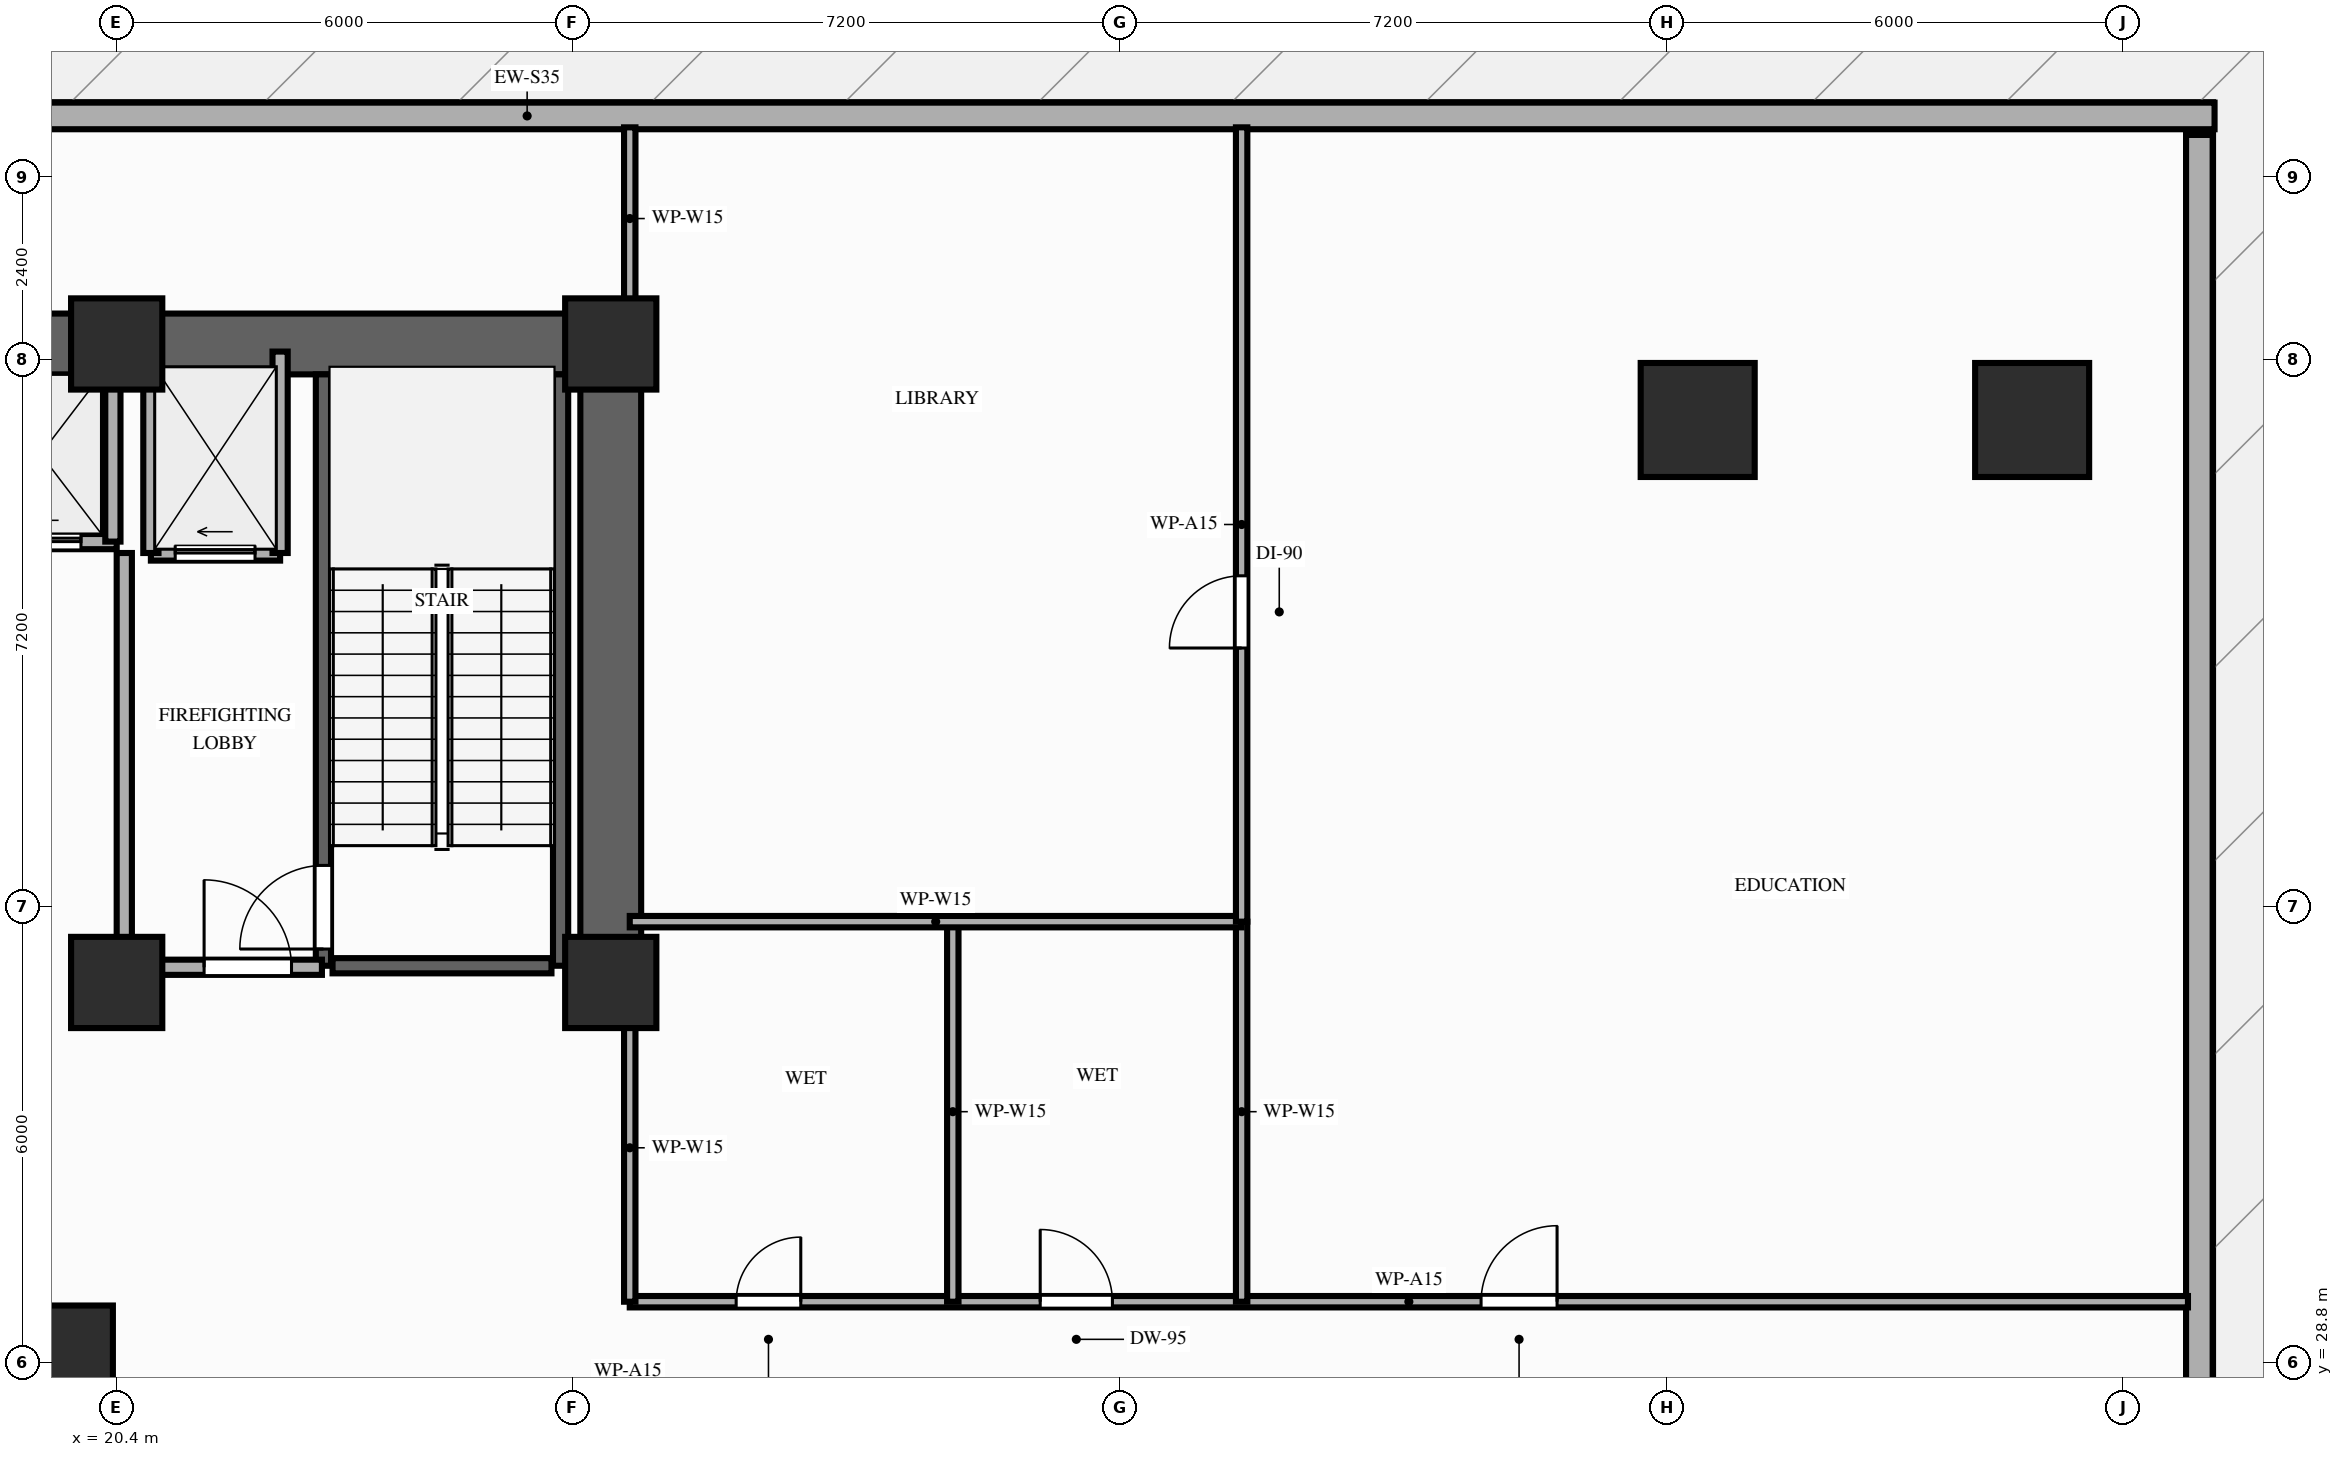
"""IFC4 building model, lengths in metres.
Left out: names, types, materials, properties, quantities, classifications, styles, units other than length and angle.
Written with IfcOpenShell. Run it as: python <this file> out.ifc"""

import sys

from ifc_helpers import new_model, si_unit, direction, frame, frame_2d, origin, origin_2d, place, context, subcontext, project, spatial, rectangle, extrude, element, fill, save


model = new_model("IFC4")
c1 = context("Model", 3, precision=1e-05, world=origin(), true_north=direction((0.0, 1.0)))
c2 = subcontext(c1, "Body", "Model", "MODEL_VIEW")
j1 = project(units=[si_unit("LENGTHUNIT", "METRE"), si_unit("PLANEANGLEUNIT", "RADIAN")], contexts=[c1])
p1 = place(None, origin())
s1 = spatial("IfcSite", under=j1, at=p1, CompositionType="ELEMENT")
p2 = place(p1, origin())
s2 = spatial("IfcBuilding", under=s1, at=p2, CompositionType="ELEMENT")
p3 = place(p2, frame((0.0, 0.0, 21.8)))
s3 = spatial("IfcBuildingStorey", under=s2, at=p3, CompositionType="ELEMENT", Elevation=21.8)
for number, where, z_axis, x_axis in (
    (1, (20.4, 33.8, 0.0), (0.0, 0.0, 1.0), (1.0, 0.0, 0.0)),
    (2, (26.9, 33.8, 0.0), (0.0, 0.0, 1.0), (1.0, 0.0, 0.0)),
    (3, (20.4, 42.2, 0.0), (0.0, 0.0, 1.0), (1.0, 0.0, 0.0)),
    (4, (26.9, 42.2, 0.0), (0.0, 0.0, 1.0), (1.0, 0.0, 0.0)),
):
    element("IfcColumn", number, at=place(p3, frame(where, z_axis=z_axis, x_axis=x_axis)), inside=s3, PredefinedType="COLUMN", context=c2, shape_type="SweptSolid", body=[
        extrude(rectangle(XDim=1.2, YDim=1.2, at=origin_2d()), origin(), (0.0, 0.0, 1.0), 4.6),
    ])
for number, where, z_axis, x_axis in (
    (5, (19.6, 28.8, 0.0), (0.0, 0.0, 1.0), (1.0, 0.0, 0.0)),
    (6, (41.2, 41.2, 0.0), (0.0, 0.0, 1.0), (1.0, 0.0, 0.0)),
):
    element("IfcColumn", number, at=place(p3, frame(where, z_axis=z_axis, x_axis=x_axis)), inside=s3, PredefinedType="COLUMN", context=c2, shape_type="SweptSolid", body=[
        extrude(rectangle(XDim=1.5, YDim=1.5, at=origin_2d()), origin(), (0.0, 0.0, 1.0), 4.05),
    ])
p4 = place(p3, frame((45.6, 41.2, 0.0), z_axis=(0.0, 0.0, 1.0), x_axis=(1.0, 0.0, 0.0)))
e7 = element("IfcColumn", 7, at=p4, inside=s3, PredefinedType="COLUMN", context=c2, shape_type="SweptSolid", body=[
    extrude(rectangle(XDim=1.5, YDim=1.5, at=origin_2d()), origin(), (0.0, 0.0, 1.0), 4.6),
])
p5 = place(p3, frame((48.0, 45.2, 0.0), z_axis=(0.0, 0.0, 1.0), x_axis=(-1.0, 0.0, 0.0)))
e8 = element("IfcWall", 8, at=p5, inside=s3, PredefinedType="STANDARD", context=c2, shape_type="SweptSolid", body=[
    extrude(rectangle(XDim=44.4, YDim=0.35, at=frame_2d((22.2, 0.0))), origin(), (0.0, 0.0, 1.0), 4.36),
])
p6 = place(p3, frame((47.8, 8.65, 0.0), z_axis=(0.0, 0.0, 1.0), x_axis=(0.0, 1.0, 0.0)))
e9 = element("IfcWall", 9, at=p6, inside=s3, PredefinedType="STANDARD", context=c2, shape_type="SweptSolid", body=[
    extrude(rectangle(XDim=36.3, YDim=0.35, at=frame_2d((18.15, 0.0))), origin(), (0.0, 0.0, 1.0), 4.36),
])
p7 = place(p6, frame((3.4, 0.0, 0.0)))
e10 = element("IfcOpeningElement", 10, at=p7, cuts=e9, PredefinedType="OPENING", context=c2, shape_type="SweptSolid", body=[
    extrude(rectangle(XDim=1.6, YDim=2.15, at=frame_2d((0.8, 1.075))), frame((0.0, 0.185, 0.0), z_axis=(0.0, -1.0, 0.0), x_axis=(1.0, 0.0, 0.0)), (0.0, 0.0, 1.0), 0.37),
])
p8 = place(p3, frame((6.45, 42.2, 0.0), z_axis=(0.0, 0.0, 1.0), x_axis=(1.0, 0.0, 0.0)))
e11 = element("IfcWall", 11, at=p8, inside=s3, PredefinedType="SHEAR", context=c2, shape_type="SweptSolid", body=[
    extrude(rectangle(XDim=20.45, YDim=0.8, at=frame_2d((10.225, 0.0))), origin(), (0.0, 0.0, 1.0), 4.36),
])
p9 = place(p3, frame((26.9, 33.8, 0.0), z_axis=(0.0, 0.0, 1.0), x_axis=(0.0, 1.0, 0.0)))
e12 = element("IfcWall", 12, at=p9, inside=s3, PredefinedType="SHEAR", context=c2, shape_type="SweptSolid", body=[
    extrude(rectangle(XDim=7.95, YDim=0.8, at=frame_2d((3.975, 0.0))), origin(), (0.0, 0.0, 1.0), 4.36),
])
p10 = place(p3, frame((23.12, 34.02, 0.0), z_axis=(0.0, 0.0, 1.0), x_axis=(0.0, 1.0, 0.0)))
e13 = element("IfcWall", 13, at=p10, inside=s3, PredefinedType="SHEAR", context=c2, shape_type="SweptSolid", body=[
    extrude(rectangle(XDim=7.78, YDim=0.2, at=frame_2d((3.89, 0.0))), origin(), (0.0, 0.0, 1.0), 4.36),
])
p11 = place(p10, frame((0.22, 0.0, 0.0)))
e14 = element("IfcOpeningElement", 14, at=p11, cuts=e13, PredefinedType="OPENING", context=c2, shape_type="SweptSolid", body=[
    extrude(rectangle(XDim=1.1, YDim=2.15, at=frame_2d((0.55, 1.075))), frame((0.0, 0.11, 0.0), z_axis=(0.0, -1.0, 0.0), x_axis=(1.0, 0.0, 0.0)), (0.0, 0.0, 1.0), 0.22),
])
p12 = place(p3, frame((26.24, 34.02, 0.0), z_axis=(0.0, 0.0, 1.0), x_axis=(0.0, 1.0, 0.0)))
e15 = element("IfcWall", 15, at=p12, inside=s3, PredefinedType="SHEAR", context=c2, shape_type="SweptSolid", body=[
    extrude(rectangle(XDim=7.78, YDim=0.2, at=frame_2d((3.89, 0.0))), origin(), (0.0, 0.0, 1.0), 4.36),
])
p13 = place(p3, frame((23.24, 34.02, 0.0), z_axis=(0.0, 0.0, 1.0), x_axis=(1.0, 0.0, 0.0)))
e16 = element("IfcWall", 16, at=p13, inside=s3, PredefinedType="SHEAR", context=c2, shape_type="SweptSolid", body=[
    extrude(rectangle(XDim=2.88, YDim=0.2, at=frame_2d((1.44, 0.0))), origin(), (0.0, 0.0, 1.0), 4.36),
])
p14 = place(p3, frame((20.85, 39.45, 0.0), z_axis=(0.0, 0.0, 1.0), x_axis=(1.0, 0.0, 0.0)))
e17 = element("IfcWall", 17, at=p14, inside=s3, PredefinedType="MOVABLE", context=c2, shape_type="SweptSolid", body=[
    extrude(rectangle(XDim=1.7, YDim=0.2, at=frame_2d((0.85, 0.0))), origin(), (0.0, 0.0, 1.0), 4.36),
])
p15 = place(p14, frame((0.32, 0.0, 0.0)))
e18 = element("IfcOpeningElement", 18, at=p15, cuts=e17, PredefinedType="OPENING", context=c2, shape_type="SweptSolid", body=[
    extrude(rectangle(XDim=1.05, YDim=2.15, at=frame_2d((0.525, 1.075))), frame((0.0, 0.11, 0.0), z_axis=(0.0, -1.0, 0.0), x_axis=(1.0, 0.0, 0.0)), (0.0, 0.0, 1.0), 0.22),
])
for number, where, z_axis, x_axis in (
    (19, (20.85, 39.45, 0.0), (0.0, 0.0, 1.0), (0.0, 1.0, 0.0)),
    (20, (22.55, 39.45, 0.0), (0.0, 0.0, 1.0), (0.0, 1.0, 0.0)),
):
    element("IfcWall", number, at=place(p3, frame(where, z_axis=z_axis, x_axis=x_axis)), inside=s3, PredefinedType="MOVABLE", context=c2, shape_type="SweptSolid", body=[
        extrude(rectangle(XDim=2.65, YDim=0.2, at=frame_2d((1.325, 0.0))), origin(), (0.0, 0.0, 1.0), 3.74),
    ])
p16 = place(p3, frame((20.5, 34.0, 0.0), z_axis=(0.0, 0.0, 1.0), x_axis=(0.0, 1.0, 0.0)))
e21 = element("IfcWall", 21, at=p16, inside=s3, PredefinedType="PARTITIONING", context=c2, shape_type="SweptSolid", body=[
    extrude(rectangle(XDim=5.45, YDim=0.2, at=frame_2d((2.725, 0.0))), origin(), (0.0, 0.0, 1.0), 3.74),
])
p17 = place(p3, frame((20.5, 34.0, 0.0), z_axis=(0.0, 0.0, 1.0), x_axis=(1.0, 0.0, 0.0)))
e22 = element("IfcWall", 22, at=p17, inside=s3, PredefinedType="PARTITIONING", context=c2, shape_type="SweptSolid", body=[
    extrude(rectangle(XDim=2.6, YDim=0.2, at=frame_2d((1.3, 0.0))), origin(), (0.0, 0.0, 1.0), 3.74),
])
p18 = place(p17, frame((1.05, 0.0, 0.0)))
e23 = element("IfcOpeningElement", 23, at=p18, cuts=e22, PredefinedType="OPENING", context=c2, shape_type="SweptSolid", body=[
    extrude(rectangle(XDim=1.15, YDim=2.15, at=frame_2d((0.575, 1.075))), frame((0.0, 0.11, 0.0), z_axis=(0.0, -1.0, 0.0), x_axis=(1.0, 0.0, 0.0)), (0.0, 0.0, 1.0), 0.22),
])
p19 = place(p3, frame((13.0, 39.6, 0.0), z_axis=(0.0, 0.0, 1.0), x_axis=(1.0, 0.0, 0.0)))
e24 = element("IfcWall", 24, at=p19, inside=s3, PredefinedType="MOVABLE", context=c2, shape_type="SweptSolid", body=[
    extrude(rectangle(XDim=7.4, YDim=0.2, at=frame_2d((3.7, 0.0))), origin(), (0.0, 0.0, 1.0), 4.36),
])
p20 = place(p19, frame((0.47, 0.0, 0.0)))
e25 = element("IfcOpeningElement", 25, at=p20, cuts=e24, PredefinedType="OPENING", context=c2, shape_type="SweptSolid", body=[
    extrude(rectangle(XDim=1.05, YDim=2.15, at=frame_2d((0.525, 1.075))), frame((0.0, 0.11, 0.0), z_axis=(0.0, -1.0, 0.0), x_axis=(1.0, 0.0, 0.0)), (0.0, 0.0, 1.0), 0.22),
])
p21 = place(p19, frame((2.28, 0.0, 0.0)))
e26 = element("IfcOpeningElement", 26, at=p21, cuts=e24, PredefinedType="OPENING", context=c2, shape_type="SweptSolid", body=[
    extrude(rectangle(XDim=1.05, YDim=2.15, at=frame_2d((0.525, 1.075))), frame((0.0, 0.11, 0.0), z_axis=(0.0, -1.0, 0.0), x_axis=(1.0, 0.0, 0.0)), (0.0, 0.0, 1.0), 0.22),
])
p22 = place(p19, frame((4.08, 0.0, 0.0)))
e27 = element("IfcOpeningElement", 27, at=p22, cuts=e24, PredefinedType="OPENING", context=c2, shape_type="SweptSolid", body=[
    extrude(rectangle(XDim=1.05, YDim=2.15, at=frame_2d((0.525, 1.075))), frame((0.0, 0.11, 0.0), z_axis=(0.0, -1.0, 0.0), x_axis=(1.0, 0.0, 0.0)), (0.0, 0.0, 1.0), 0.22),
])
p23 = place(p19, frame((5.88, 0.0, 0.0)))
e28 = element("IfcOpeningElement", 28, at=p23, cuts=e24, PredefinedType="OPENING", context=c2, shape_type="SweptSolid", body=[
    extrude(rectangle(XDim=1.05, YDim=2.15, at=frame_2d((0.525, 1.075))), frame((0.0, 0.11, 0.0), z_axis=(0.0, -1.0, 0.0), x_axis=(1.0, 0.0, 0.0)), (0.0, 0.0, 1.0), 0.22),
])
p24 = place(p3, frame((20.35, 39.6, 0.0), z_axis=(0.0, 0.0, 1.0), x_axis=(0.0, 1.0, 0.0)))
e29 = element("IfcWall", 29, at=p24, inside=s3, PredefinedType="MOVABLE", context=c2, shape_type="SweptSolid", body=[
    extrude(rectangle(XDim=2.18, YDim=0.2, at=frame_2d((1.09, 0.0))), origin(), (0.0, 0.0, 1.0), 4.36),
])
p25 = place(p3, frame((27.15, 29.6, 0.0), z_axis=(0.0, 0.0, 1.0), x_axis=(1.0, 0.0, 0.0)))
e30 = element("IfcWall", 30, at=p25, inside=s3, PredefinedType="PARTITIONING", context=c2, shape_type="SweptSolid", body=[
    extrude(rectangle(XDim=20.5, YDim=0.15, at=frame_2d((10.25, 0.0))), origin(), (0.0, 0.0, 1.0), 3.74),
])
p26 = place(p25, frame((1.4, 0.0, 0.0)))
e31 = element("IfcOpeningElement", 31, at=p26, cuts=e30, PredefinedType="OPENING", context=c2, shape_type="SweptSolid", body=[
    extrude(rectangle(XDim=0.85, YDim=2.1, at=frame_2d((0.425, 1.05))), frame((0.0, 0.085, 0.0), z_axis=(0.0, -1.0, 0.0), x_axis=(1.0, 0.0, 0.0)), (0.0, 0.0, 1.0), 0.17),
])
p27 = place(p25, frame((5.4, 0.0, 0.0)))
e32 = element("IfcOpeningElement", 32, at=p27, cuts=e30, PredefinedType="OPENING", context=c2, shape_type="SweptSolid", body=[
    extrude(rectangle(XDim=0.95, YDim=2.1, at=frame_2d((0.475, 1.05))), frame((0.0, 0.085, 0.0), z_axis=(0.0, -1.0, 0.0), x_axis=(1.0, 0.0, 0.0)), (0.0, 0.0, 1.0), 0.17),
])
p28 = place(p25, frame((11.2, 0.0, 0.0)))
e33 = element("IfcOpeningElement", 33, at=p28, cuts=e30, PredefinedType="OPENING", context=c2, shape_type="SweptSolid", body=[
    extrude(rectangle(XDim=1.0, YDim=2.15, at=frame_2d((0.5, 1.075))), frame((0.0, 0.085, 0.0), z_axis=(0.0, -1.0, 0.0), x_axis=(1.0, 0.0, 0.0)), (0.0, 0.0, 1.0), 0.17),
])
p29 = place(p3, frame((27.15, 29.6, 0.0), z_axis=(0.0, 0.0, 1.0), x_axis=(0.0, 1.0, 0.0)))
e34 = element("IfcWall", 34, at=p29, inside=s3, PredefinedType="PARTITIONING", context=c2, shape_type="SweptSolid", body=[
    extrude(rectangle(XDim=4.05, YDim=0.15, at=frame_2d((2.025, 0.0))), origin(), (0.0, 0.0, 1.0), 3.74),
])
p30 = place(p3, frame((27.15, 42.65, 0.0), z_axis=(0.0, 0.0, 1.0), x_axis=(0.0, 1.0, 0.0)))
e35 = element("IfcWall", 35, at=p30, inside=s3, PredefinedType="PARTITIONING", context=c2, shape_type="SweptSolid", body=[
    extrude(rectangle(XDim=2.4, YDim=0.15, at=frame_2d((1.2, 0.0))), origin(), (0.0, 0.0, 1.0), 4.36),
])
p31 = place(p3, frame((31.4, 29.6, 0.0), z_axis=(0.0, 0.0, 1.0), x_axis=(0.0, 1.0, 0.0)))
e36 = element("IfcWall", 36, at=p31, inside=s3, PredefinedType="PARTITIONING", context=c2, shape_type="SweptSolid", body=[
    extrude(rectangle(XDim=5.0, YDim=0.15, at=frame_2d((2.5, 0.0))), origin(), (0.0, 0.0, 1.0), 3.74),
])
p32 = place(p3, frame((35.2, 29.6, 0.0), z_axis=(0.0, 0.0, 1.0), x_axis=(0.0, 1.0, 0.0)))
e37 = element("IfcWall", 37, at=p32, inside=s3, PredefinedType="PARTITIONING", context=c2, shape_type="SweptSolid", body=[
    extrude(rectangle(XDim=5.0, YDim=0.15, at=frame_2d((2.5, 0.0))), origin(), (0.0, 0.0, 1.0), 3.95),
])
p33 = place(p3, frame((27.15, 34.6, 0.0), z_axis=(0.0, 0.0, 1.0), x_axis=(1.0, 0.0, 0.0)))
e38 = element("IfcWall", 38, at=p33, inside=s3, PredefinedType="PARTITIONING", context=c2, shape_type="SweptSolid", body=[
    extrude(rectangle(XDim=8.05, YDim=0.15, at=frame_2d((4.025, 0.0))), origin(), (0.0, 0.0, 1.0), 3.74),
])
p34 = place(p3, frame((35.2, 34.6, 0.0), z_axis=(0.0, 0.0, 1.0), x_axis=(0.0, 1.0, 0.0)))
e39 = element("IfcWall", 39, at=p34, inside=s3, PredefinedType="PARTITIONING", context=c2, shape_type="SweptSolid", body=[
    extrude(rectangle(XDim=10.45, YDim=0.15, at=frame_2d((5.225, 0.0))), origin(), (0.0, 0.0, 1.0), 2.34),
])
p35 = place(p34, frame((3.6, 0.0, 0.0)))
e40 = element("IfcOpeningElement", 40, at=p35, cuts=e39, PredefinedType="OPENING", context=c2, shape_type="SweptSolid", body=[
    extrude(rectangle(XDim=0.95, YDim=2.15, at=frame_2d((0.475, 1.075))), frame((0.0, 0.085, 0.0), z_axis=(0.0, -1.0, 0.0), x_axis=(1.0, 0.0, 0.0)), (0.0, 0.0, 1.0), 0.17),
])
p36 = place(p11, origin())
e41 = element("IfcDoor", 41, at=p36, inside=s3, OperationType="SINGLE_SWING_LEFT", PredefinedType="DOOR", context=c2, shape_type="SweptSolid", body=[
    extrude(rectangle(XDim=1.1, YDim=2.15, at=frame_2d((0.55, 1.075))), frame((0.0, 0.025, 0.0), z_axis=(0.0, -1.0, 0.0), x_axis=(1.0, 0.0, 0.0)), (0.0, 0.0, 1.0), 0.05),
])
fill(e14, e41)
p37 = place(p15, origin())
e42 = element("IfcDoor", 42, at=p37, inside=s3, OperationType="SLIDING_TO_LEFT", PredefinedType="DOOR", context=c2, shape_type="SweptSolid", body=[
    extrude(rectangle(XDim=1.05, YDim=2.15, at=frame_2d((0.525, 1.075))), frame((0.0, 0.025, 0.0), z_axis=(0.0, -1.0, 0.0), x_axis=(1.0, 0.0, 0.0)), (0.0, 0.0, 1.0), 0.05),
])
fill(e18, e42)
p38 = place(p18, origin())
e43 = element("IfcDoor", 43, at=p38, inside=s3, OperationType="SINGLE_SWING_LEFT", PredefinedType="DOOR", context=c2, shape_type="SweptSolid", body=[
    extrude(rectangle(XDim=1.15, YDim=2.15, at=frame_2d((0.575, 1.075))), frame((0.0, 0.025, 0.0), z_axis=(0.0, -1.0, 0.0), x_axis=(1.0, 0.0, 0.0)), (0.0, 0.0, 1.0), 0.05),
])
fill(e23, e43)
p39 = place(p23, origin())
e44 = element("IfcDoor", 44, at=p39, inside=s3, OperationType="SLIDING_TO_LEFT", PredefinedType="DOOR", context=c2, shape_type="SweptSolid", body=[
    extrude(rectangle(XDim=1.05, YDim=2.15, at=frame_2d((0.525, 1.075))), frame((0.0, 0.025, 0.0), z_axis=(0.0, -1.0, 0.0), x_axis=(1.0, 0.0, 0.0)), (0.0, 0.0, 1.0), 0.05),
])
fill(e28, e44)
p40 = place(p26, origin())
e45 = element("IfcDoor", 45, at=p40, inside=s3, OperationType="SINGLE_SWING_RIGHT", PredefinedType="DOOR", context=c2, shape_type="SweptSolid", body=[
    extrude(rectangle(XDim=0.85, YDim=2.1, at=frame_2d((0.425, 1.05))), frame((0.0, 0.025, 0.0), z_axis=(0.0, -1.0, 0.0), x_axis=(1.0, 0.0, 0.0)), (0.0, 0.0, 1.0), 0.05),
])
fill(e31, e45)
p41 = place(p27, origin())
e46 = element("IfcDoor", 46, at=p41, inside=s3, OperationType="SINGLE_SWING_LEFT", PredefinedType="DOOR", context=c2, shape_type="SweptSolid", body=[
    extrude(rectangle(XDim=0.95, YDim=2.1, at=frame_2d((0.475, 1.05))), frame((0.0, 0.025, 0.0), z_axis=(0.0, -1.0, 0.0), x_axis=(1.0, 0.0, 0.0)), (0.0, 0.0, 1.0), 0.05),
])
fill(e32, e46)
p42 = place(p28, origin())
e47 = element("IfcDoor", 47, at=p42, inside=s3, OperationType="SINGLE_SWING_RIGHT", PredefinedType="DOOR", context=c2, shape_type="SweptSolid", body=[
    extrude(rectangle(XDim=1.0, YDim=2.15, at=frame_2d((0.5, 1.075))), frame((0.0, 0.025, 0.0), z_axis=(0.0, -1.0, 0.0), x_axis=(1.0, 0.0, 0.0)), (0.0, 0.0, 1.0), 0.05),
])
fill(e33, e47)
p43 = place(p35, origin())
e48 = element("IfcDoor", 48, at=p43, inside=s3, OperationType="SINGLE_SWING_LEFT", PredefinedType="DOOR", context=c2, shape_type="SweptSolid", body=[
    extrude(rectangle(XDim=0.95, YDim=2.15, at=frame_2d((0.475, 1.075))), frame((0.0, 0.025, 0.0), z_axis=(0.0, -1.0, 0.0), x_axis=(1.0, 0.0, 0.0)), (0.0, 0.0, 1.0), 0.05),
])
fill(e40, e48)
save(model, sys.argv[1])
